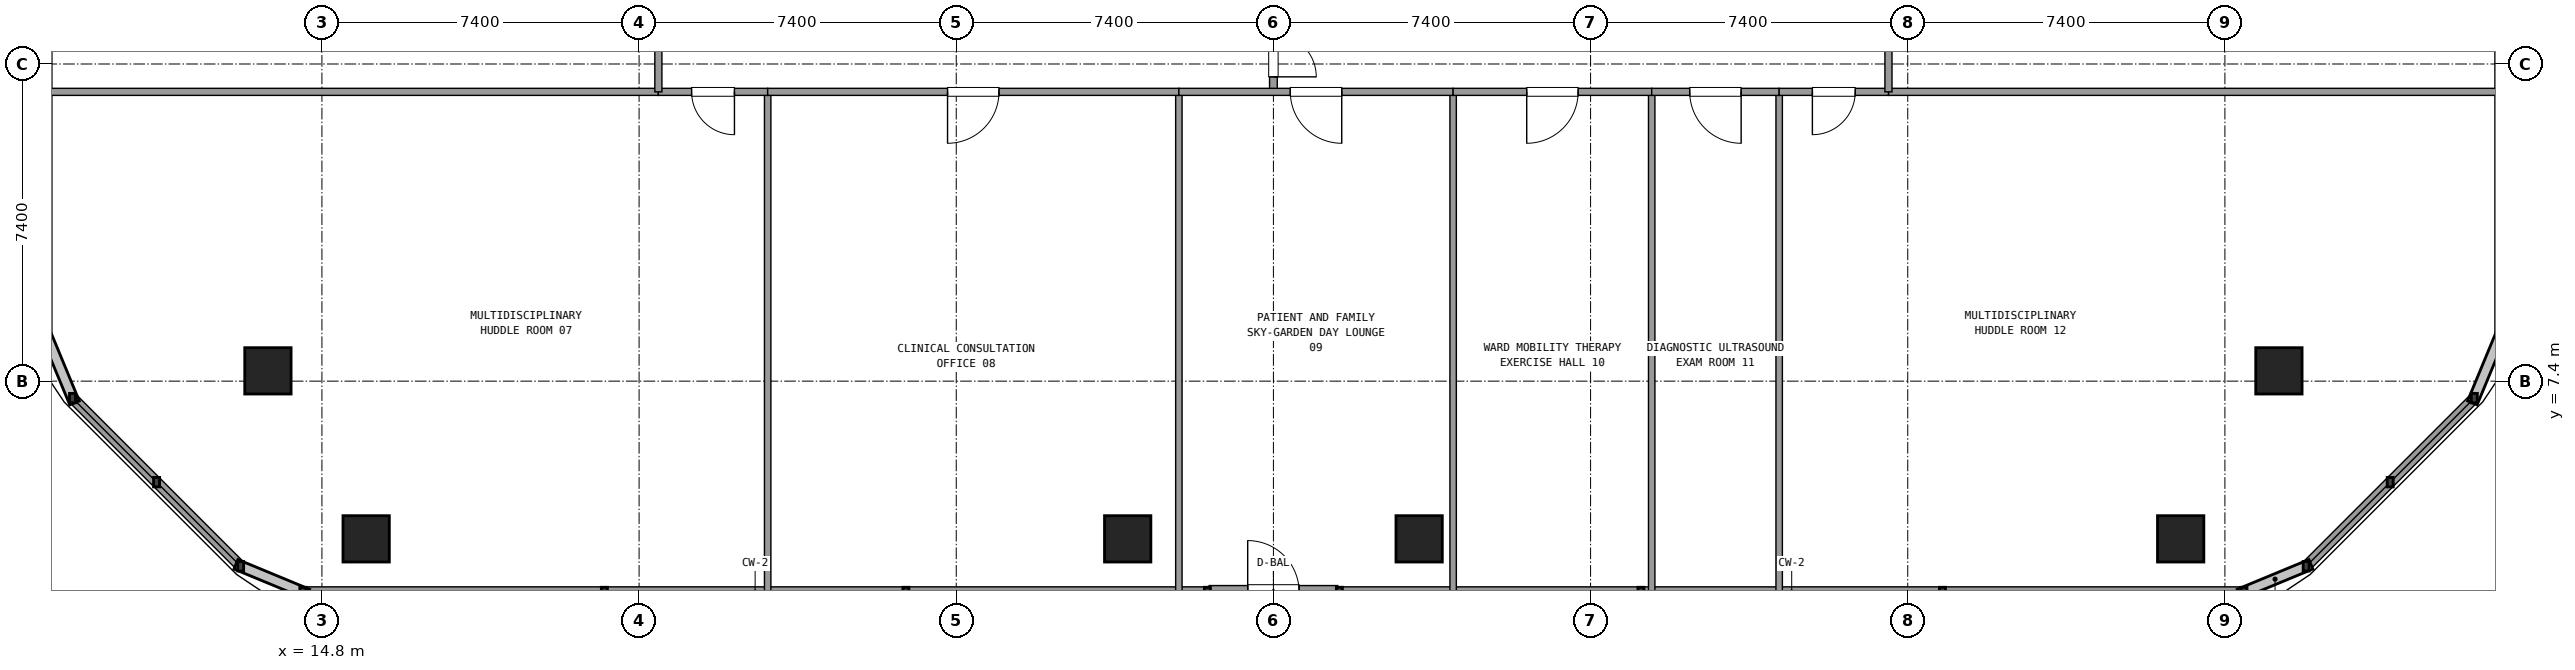
"""IFC4 building model, lengths in metres.
Left out: names, types, materials, properties, quantities, classifications, styles, units other than length and angle.
Written with IfcOpenShell. Run it as: python <this file> out.ifc"""

import sys

from ifc_helpers import new_model, si_unit, direction, frame, frame_2d, origin, origin_2d, place, context, subcontext, project, spatial, rectangle, extrude, element, fill, save


model = new_model("IFC4")
c1 = context("Model", 3, precision=1e-05, world=origin(), true_north=direction((0.0, 1.0)))
c2 = subcontext(c1, "Body", "Model", "MODEL_VIEW")
j1 = project(units=[si_unit("LENGTHUNIT", "METRE"), si_unit("PLANEANGLEUNIT", "RADIAN")], contexts=[c1])
p1 = place(None, origin())
s1 = spatial("IfcSite", under=j1, at=p1, CompositionType="ELEMENT")
p2 = place(p1, origin())
s2 = spatial("IfcBuilding", under=s1, at=p2, CompositionType="ELEMENT")
p3 = place(p2, frame((0.0, 0.0, 34.74)))
s3 = spatial("IfcBuildingStorey", under=s2, at=p3, CompositionType="ELEMENT", Elevation=34.74)
for number, where, z_axis, x_axis in (
    (1, (13.54, 7.64, 0.0), (0.0, 0.0, 1.0), (1.0, 0.0, 0.0)),
    (2, (15.832, 3.72, 0.0), (0.0, 0.0, 1.0), (1.0, 0.0, 0.0)),
    (3, (33.6, 3.72, 0.0), (0.0, 0.0, 1.0), (1.0, 0.0, 0.0)),
    (4, (40.4, 3.72, 0.0), (0.0, 0.0, 1.0), (1.0, 0.0, 0.0)),
    (5, (58.168, 3.72, 0.0), (0.0, 0.0, 1.0), (1.0, 0.0, 0.0)),
    (6, (60.46, 7.64, 0.0), (0.0, 0.0, 1.0), (1.0, 0.0, 0.0)),
):
    element("IfcColumn", number, at=place(p3, frame(where, z_axis=z_axis, x_axis=x_axis)), inside=s3, PredefinedType="COLUMN", context=c2, shape_type="SweptSolid", body=[
        extrude(rectangle(XDim=1.08, YDim=1.08, at=origin_2d()), origin(), (0.0, 0.0, 1.0), 3.6),
    ])
p4 = place(p3, frame((35.5, 2.48, 0.0), z_axis=(0.0, 0.0, 1.0), x_axis=(1.0, 0.0, 0.0)))
e7 = element("IfcWall", 7, at=p4, inside=s3, PredefinedType="SOLIDWALL", context=c2, shape_type="SweptSolid", body=[
    extrude(rectangle(XDim=3.0, YDim=0.3, at=frame_2d((1.5, 0.0))), origin(), (0.0, 0.0, 1.0), 2.65),
])
p5 = place(p4, frame((0.9, 0.0, 0.0)))
e8 = element("IfcOpeningElement", 8, at=p5, cuts=e7, PredefinedType="OPENING", context=c2, shape_type="SweptSolid", body=[
    extrude(rectangle(XDim=1.2, YDim=2.2, at=frame_2d((0.6, 1.1))), frame((0.0, 0.16, 0.0), z_axis=(0.0, -1.0, 0.0), x_axis=(1.0, 0.0, 0.0)), (0.0, 0.0, 1.0), 0.32),
])
for number, where, z_axis, x_axis in (
    (9, (14.355, 2.48, 0.0), (0.0, 0.0, 1.0), (1.0, 0.0, 0.0)),
    (10, (38.54, 2.48, 0.0), (0.0, 0.0, 1.0), (1.0, 0.0, 0.0)),
):
    element("IfcWall", number, at=place(p3, frame(where, z_axis=z_axis, x_axis=x_axis)), inside=s3, PredefinedType="SOLIDWALL", context=c2, shape_type="SweptSolid", body=[
        extrude(rectangle(XDim=21.105, YDim=0.24, at=frame_2d((10.552, 0.0))), origin(), (0.0, 0.0, 1.0), 0.85),
    ])
for number, where, z_axis, x_axis in (
    (11, (61.096, 3.081, 0.0), (0.0, 0.0, 1.0), (0.707, 0.707, 0.0)),
    (12, (8.981, 7.004, 0.0), (0.0, 0.0, 1.0), (0.707, -0.707, 0.0)),
):
    element("IfcWall", number, at=place(p3, frame(where, z_axis=z_axis, x_axis=x_axis)), inside=s3, PredefinedType="SOLIDWALL", context=c2, shape_type="SweptSolid", body=[
        extrude(rectangle(XDim=5.548, YDim=0.24, at=frame_2d((2.774, 0.0))), origin(), (0.0, 0.0, 1.0), 0.85),
    ])
p6 = place(p3, frame((37.0, 14.15, 0.0), z_axis=(0.0, 0.0, 1.0), x_axis=(0.0, 1.0, 0.0)))
e13 = element("IfcWall", 13, at=p6, inside=s3, PredefinedType="PARTITIONING", context=c2, shape_type="SweptSolid", body=[
    extrude(rectangle(XDim=2.7, YDim=0.18, at=frame_2d((1.35, 0.0))), origin(), (0.0, 0.0, 1.0), 2.61),
])
p7 = place(p6, frame((0.35, 0.0, 0.0)))
e14 = element("IfcOpeningElement", 14, at=p7, cuts=e13, PredefinedType="OPENING", context=c2, shape_type="SweptSolid", body=[
    extrude(rectangle(XDim=2.0, YDim=2.2, at=frame_2d((1.0, 1.1))), frame((0.0, 0.1, 0.0), z_axis=(0.0, -1.0, 0.0), x_axis=(1.0, 0.0, 0.0)), (0.0, 0.0, 1.0), 0.2),
])
for number, where, z_axis, x_axis in (
    (15, (8.4, 14.15, 0.0), (0.0, 0.0, 1.0), (1.0, 0.0, 0.0)),
    (16, (51.35, 14.15, 0.0), (0.0, 0.0, 1.0), (1.0, 0.0, 0.0)),
):
    element("IfcWall", number, at=place(p3, frame(where, z_axis=z_axis, x_axis=x_axis)), inside=s3, PredefinedType="PARTITIONING", context=c2, shape_type="SweptSolid", body=[
        extrude(rectangle(XDim=14.25, YDim=0.165, at=frame_2d((7.125, 0.0))), origin(), (0.0, 0.0, 1.0), 2.61),
    ])
p8 = place(p3, frame((25.2, 14.15, 0.0), z_axis=(0.0, 0.0, 1.0), x_axis=(0.0, -1.0, 0.0)))
e17 = element("IfcWall", 17, at=p8, inside=s3, PredefinedType="PARTITIONING", context=c2, shape_type="SweptSolid", body=[
    extrude(rectangle(XDim=11.65, YDim=0.15, at=frame_2d((5.825, 0.0))), origin(), (0.0, 0.0, 1.0), 2.61),
])
p9 = place(p3, frame((22.65, 14.15, 0.0), z_axis=(0.0, 0.0, 1.0), x_axis=(1.0, 0.0, 0.0)))
e18 = element("IfcWall", 18, at=p9, inside=s3, PredefinedType="PARTITIONING", context=c2, shape_type="SweptSolid", body=[
    extrude(rectangle(XDim=2.55, YDim=0.165, at=frame_2d((1.275, 0.0))), origin(), (0.0, 0.0, 1.0), 2.61),
])
p10 = place(p9, frame((0.775, 0.0, 0.0)))
e19 = element("IfcOpeningElement", 19, at=p10, cuts=e18, PredefinedType="OPENING", context=c2, shape_type="SweptSolid", body=[
    extrude(rectangle(XDim=1.0, YDim=2.15, at=frame_2d((0.5, 1.075))), frame((0.0, 0.093, 0.0), z_axis=(0.0, -1.0, 0.0), x_axis=(1.0, 0.0, 0.0)), (0.0, 0.0, 1.0), 0.185),
])
p11 = place(p3, frame((34.794, 14.15, 0.0), z_axis=(0.0, 0.0, 1.0), x_axis=(0.0, -1.0, 0.0)))
e20 = element("IfcWall", 20, at=p11, inside=s3, PredefinedType="PARTITIONING", context=c2, shape_type="SweptSolid", body=[
    extrude(rectangle(XDim=11.65, YDim=0.15, at=frame_2d((5.825, 0.0))), origin(), (0.0, 0.0, 1.0), 2.61),
])
p12 = place(p3, frame((25.2, 14.15, 0.0), z_axis=(0.0, 0.0, 1.0), x_axis=(1.0, 0.0, 0.0)))
e21 = element("IfcWall", 21, at=p12, inside=s3, PredefinedType="PARTITIONING", context=c2, shape_type="SweptSolid", body=[
    extrude(rectangle(XDim=9.594, YDim=0.165, at=frame_2d((4.797, 0.0))), origin(), (0.0, 0.0, 1.0), 2.61),
])
p13 = place(p12, frame((4.197, 0.0, 0.0)))
e22 = element("IfcOpeningElement", 22, at=p13, cuts=e21, PredefinedType="OPENING", context=c2, shape_type="SweptSolid", body=[
    extrude(rectangle(XDim=1.2, YDim=2.15, at=frame_2d((0.6, 1.075))), frame((0.0, 0.093, 0.0), z_axis=(0.0, -1.0, 0.0), x_axis=(1.0, 0.0, 0.0)), (0.0, 0.0, 1.0), 0.185),
])
p14 = place(p3, frame((41.193, 14.15, 0.0), z_axis=(0.0, 0.0, 1.0), x_axis=(0.0, -1.0, 0.0)))
e23 = element("IfcWall", 23, at=p14, inside=s3, PredefinedType="PARTITIONING", context=c2, shape_type="SweptSolid", body=[
    extrude(rectangle(XDim=11.65, YDim=0.15, at=frame_2d((5.825, 0.0))), origin(), (0.0, 0.0, 1.0), 2.61),
])
p15 = place(p3, frame((34.794, 14.15, 0.0), z_axis=(0.0, 0.0, 1.0), x_axis=(1.0, 0.0, 0.0)))
e24 = element("IfcWall", 24, at=p15, inside=s3, PredefinedType="PARTITIONING", context=c2, shape_type="SweptSolid", body=[
    extrude(rectangle(XDim=6.399, YDim=0.165, at=frame_2d((3.2, 0.0))), origin(), (0.0, 0.0, 1.0), 2.61),
])
p16 = place(p15, frame((2.6, 0.0, 0.0)))
e25 = element("IfcOpeningElement", 25, at=p16, cuts=e24, PredefinedType="OPENING", context=c2, shape_type="SweptSolid", body=[
    extrude(rectangle(XDim=1.2, YDim=2.15, at=frame_2d((0.6, 1.075))), frame((0.0, 0.093, 0.0), z_axis=(0.0, -1.0, 0.0), x_axis=(1.0, 0.0, 0.0)), (0.0, 0.0, 1.0), 0.185),
])
p17 = place(p3, frame((45.826, 14.15, 0.0), z_axis=(0.0, 0.0, 1.0), x_axis=(0.0, -1.0, 0.0)))
e26 = element("IfcWall", 26, at=p17, inside=s3, PredefinedType="PARTITIONING", context=c2, shape_type="SweptSolid", body=[
    extrude(rectangle(XDim=11.65, YDim=0.15, at=frame_2d((5.825, 0.0))), origin(), (0.0, 0.0, 1.0), 2.61),
])
p18 = place(p3, frame((41.193, 14.15, 0.0), z_axis=(0.0, 0.0, 1.0), x_axis=(1.0, 0.0, 0.0)))
e27 = element("IfcWall", 27, at=p18, inside=s3, PredefinedType="PARTITIONING", context=c2, shape_type="SweptSolid", body=[
    extrude(rectangle(XDim=4.633, YDim=0.165, at=frame_2d((2.316, 0.0))), origin(), (0.0, 0.0, 1.0), 2.61),
])
p19 = place(p18, frame((1.717, 0.0, 0.0)))
e28 = element("IfcOpeningElement", 28, at=p19, cuts=e27, PredefinedType="OPENING", context=c2, shape_type="SweptSolid", body=[
    extrude(rectangle(XDim=1.2, YDim=2.15, at=frame_2d((0.6, 1.075))), frame((0.0, 0.093, 0.0), z_axis=(0.0, -1.0, 0.0), x_axis=(1.0, 0.0, 0.0)), (0.0, 0.0, 1.0), 0.185),
])
p20 = place(p3, frame((48.8, 14.15, 0.0), z_axis=(0.0, 0.0, 1.0), x_axis=(0.0, -1.0, 0.0)))
e29 = element("IfcWall", 29, at=p20, inside=s3, PredefinedType="PARTITIONING", context=c2, shape_type="SweptSolid", body=[
    extrude(rectangle(XDim=11.65, YDim=0.15, at=frame_2d((5.825, 0.0))), origin(), (0.0, 0.0, 1.0), 2.61),
])
p21 = place(p3, frame((45.826, 14.15, 0.0), z_axis=(0.0, 0.0, 1.0), x_axis=(1.0, 0.0, 0.0)))
e30 = element("IfcWall", 30, at=p21, inside=s3, PredefinedType="PARTITIONING", context=c2, shape_type="SweptSolid", body=[
    extrude(rectangle(XDim=2.974, YDim=0.165, at=frame_2d((1.487, 0.0))), origin(), (0.0, 0.0, 1.0), 2.61),
])
p22 = place(p21, frame((0.887, 0.0, 0.0)))
e31 = element("IfcOpeningElement", 31, at=p22, cuts=e30, PredefinedType="OPENING", context=c2, shape_type="SweptSolid", body=[
    extrude(rectangle(XDim=1.2, YDim=2.15, at=frame_2d((0.6, 1.075))), frame((0.0, 0.093, 0.0), z_axis=(0.0, -1.0, 0.0), x_axis=(1.0, 0.0, 0.0)), (0.0, 0.0, 1.0), 0.185),
])
p23 = place(p3, frame((48.8, 14.15, 0.0), z_axis=(0.0, 0.0, 1.0), x_axis=(1.0, 0.0, 0.0)))
e32 = element("IfcWall", 32, at=p23, inside=s3, PredefinedType="PARTITIONING", context=c2, shape_type="SweptSolid", body=[
    extrude(rectangle(XDim=2.55, YDim=0.165, at=frame_2d((1.275, 0.0))), origin(), (0.0, 0.0, 1.0), 2.61),
])
p24 = place(p23, frame((0.775, 0.0, 0.0)))
e33 = element("IfcOpeningElement", 33, at=p24, cuts=e32, PredefinedType="OPENING", context=c2, shape_type="SweptSolid", body=[
    extrude(rectangle(XDim=1.0, YDim=2.15, at=frame_2d((0.5, 1.075))), frame((0.0, 0.093, 0.0), z_axis=(0.0, -1.0, 0.0), x_axis=(1.0, 0.0, 0.0)), (0.0, 0.0, 1.0), 0.185),
])
p25 = place(p3, frame((22.65, 14.15, 0.0), z_axis=(0.0, 0.0, 1.0), x_axis=(0.0, 1.0, 0.0)))
e34 = element("IfcWall", 34, at=p25, inside=s3, PredefinedType="PARTITIONING", context=c2, shape_type="SweptSolid", body=[
    extrude(rectangle(XDim=6.815, YDim=0.165, at=frame_2d((3.408, 0.0))), origin(), (0.0, 0.0, 1.0), 2.61),
])
p26 = place(p25, frame((2.807, 0.0, 0.0)))
e35 = element("IfcOpeningElement", 35, at=p26, cuts=e34, PredefinedType="OPENING", context=c2, shape_type="SweptSolid", body=[
    extrude(rectangle(XDim=1.2, YDim=2.15, at=frame_2d((0.6, 1.075))), frame((0.0, 0.093, 0.0), z_axis=(0.0, -1.0, 0.0), x_axis=(1.0, 0.0, 0.0)), (0.0, 0.0, 1.0), 0.185),
])
p27 = place(p3, frame((51.35, 14.15, 0.0), z_axis=(0.0, 0.0, 1.0), x_axis=(0.0, 1.0, 0.0)))
e36 = element("IfcWall", 36, at=p27, inside=s3, PredefinedType="PARTITIONING", context=c2, shape_type="SweptSolid", body=[
    extrude(rectangle(XDim=5.922, YDim=0.165, at=frame_2d((2.961, 0.0))), origin(), (0.0, 0.0, 1.0), 2.61),
])
p28 = place(p27, frame((2.361, 0.0, 0.0)))
e37 = element("IfcOpeningElement", 37, at=p28, cuts=e36, PredefinedType="OPENING", context=c2, shape_type="SweptSolid", body=[
    extrude(rectangle(XDim=1.2, YDim=2.15, at=frame_2d((0.6, 1.075))), frame((0.0, 0.093, 0.0), z_axis=(0.0, -1.0, 0.0), x_axis=(1.0, 0.0, 0.0)), (0.0, 0.0, 1.0), 0.185),
])
p29 = place(p7, frame((2.0, 0.0, 0.0), z_axis=(0.0, 0.0, 1.0), x_axis=(-1.0, 0.0, 0.0)))
e38 = element("IfcDoor", 38, at=p29, inside=s3, OperationType="DOUBLE_DOOR_SINGLE_SWING", PredefinedType="DOOR", context=c2, shape_type="SweptSolid", body=[
    extrude(rectangle(XDim=2.0, YDim=2.2, at=frame_2d((1.0, 1.1))), frame((0.0, 0.025, 0.0), z_axis=(0.0, -1.0, 0.0), x_axis=(1.0, 0.0, 0.0)), (0.0, 0.0, 1.0), 0.05),
])
fill(e14, e38)
p30 = place(p10, frame((1.0, 0.0, 0.0), z_axis=(0.0, 0.0, 1.0), x_axis=(-1.0, 0.0, 0.0)))
e39 = element("IfcDoor", 39, at=p30, inside=s3, OperationType="SINGLE_SWING_RIGHT", PredefinedType="DOOR", context=c2, shape_type="SweptSolid", body=[
    extrude(rectangle(XDim=1.0, YDim=2.15, at=frame_2d((0.5, 1.075))), frame((0.0, 0.025, 0.0), z_axis=(0.0, -1.0, 0.0), x_axis=(1.0, 0.0, 0.0)), (0.0, 0.0, 1.0), 0.05),
])
fill(e19, e39)
p31 = place(p13, frame((1.2, 0.0, 0.0), z_axis=(0.0, 0.0, 1.0), x_axis=(-1.0, 0.0, 0.0)))
e40 = element("IfcDoor", 40, at=p31, inside=s3, OperationType="SINGLE_SWING_LEFT", PredefinedType="DOOR", context=c2, shape_type="SweptSolid", body=[
    extrude(rectangle(XDim=1.2, YDim=2.15, at=frame_2d((0.6, 1.075))), frame((0.0, 0.025, 0.0), z_axis=(0.0, -1.0, 0.0), x_axis=(1.0, 0.0, 0.0)), (0.0, 0.0, 1.0), 0.05),
])
fill(e22, e40)
p32 = place(p16, frame((1.2, 0.0, 0.0), z_axis=(0.0, 0.0, 1.0), x_axis=(-1.0, 0.0, 0.0)))
e41 = element("IfcDoor", 41, at=p32, inside=s3, OperationType="SINGLE_SWING_RIGHT", PredefinedType="DOOR", context=c2, shape_type="SweptSolid", body=[
    extrude(rectangle(XDim=1.2, YDim=2.15, at=frame_2d((0.6, 1.075))), frame((0.0, 0.025, 0.0), z_axis=(0.0, -1.0, 0.0), x_axis=(1.0, 0.0, 0.0)), (0.0, 0.0, 1.0), 0.05),
])
fill(e25, e41)
p33 = place(p19, frame((1.2, 0.0, 0.0), z_axis=(0.0, 0.0, 1.0), x_axis=(-1.0, 0.0, 0.0)))
e42 = element("IfcDoor", 42, at=p33, inside=s3, OperationType="SINGLE_SWING_LEFT", PredefinedType="DOOR", context=c2, shape_type="SweptSolid", body=[
    extrude(rectangle(XDim=1.2, YDim=2.15, at=frame_2d((0.6, 1.075))), frame((0.0, 0.025, 0.0), z_axis=(0.0, -1.0, 0.0), x_axis=(1.0, 0.0, 0.0)), (0.0, 0.0, 1.0), 0.05),
])
fill(e28, e42)
p34 = place(p22, frame((1.2, 0.0, 0.0), z_axis=(0.0, 0.0, 1.0), x_axis=(-1.0, 0.0, 0.0)))
e43 = element("IfcDoor", 43, at=p34, inside=s3, OperationType="SINGLE_SWING_RIGHT", PredefinedType="DOOR", context=c2, shape_type="SweptSolid", body=[
    extrude(rectangle(XDim=1.2, YDim=2.15, at=frame_2d((0.6, 1.075))), frame((0.0, 0.025, 0.0), z_axis=(0.0, -1.0, 0.0), x_axis=(1.0, 0.0, 0.0)), (0.0, 0.0, 1.0), 0.05),
])
fill(e31, e43)
p35 = place(p24, frame((1.0, 0.0, 0.0), z_axis=(0.0, 0.0, 1.0), x_axis=(-1.0, 0.0, 0.0)))
e44 = element("IfcDoor", 44, at=p35, inside=s3, OperationType="SINGLE_SWING_LEFT", PredefinedType="DOOR", context=c2, shape_type="SweptSolid", body=[
    extrude(rectangle(XDim=1.0, YDim=2.15, at=frame_2d((0.5, 1.075))), frame((0.0, 0.025, 0.0), z_axis=(0.0, -1.0, 0.0), x_axis=(1.0, 0.0, 0.0)), (0.0, 0.0, 1.0), 0.05),
])
fill(e33, e44)
save(model, sys.argv[1])
